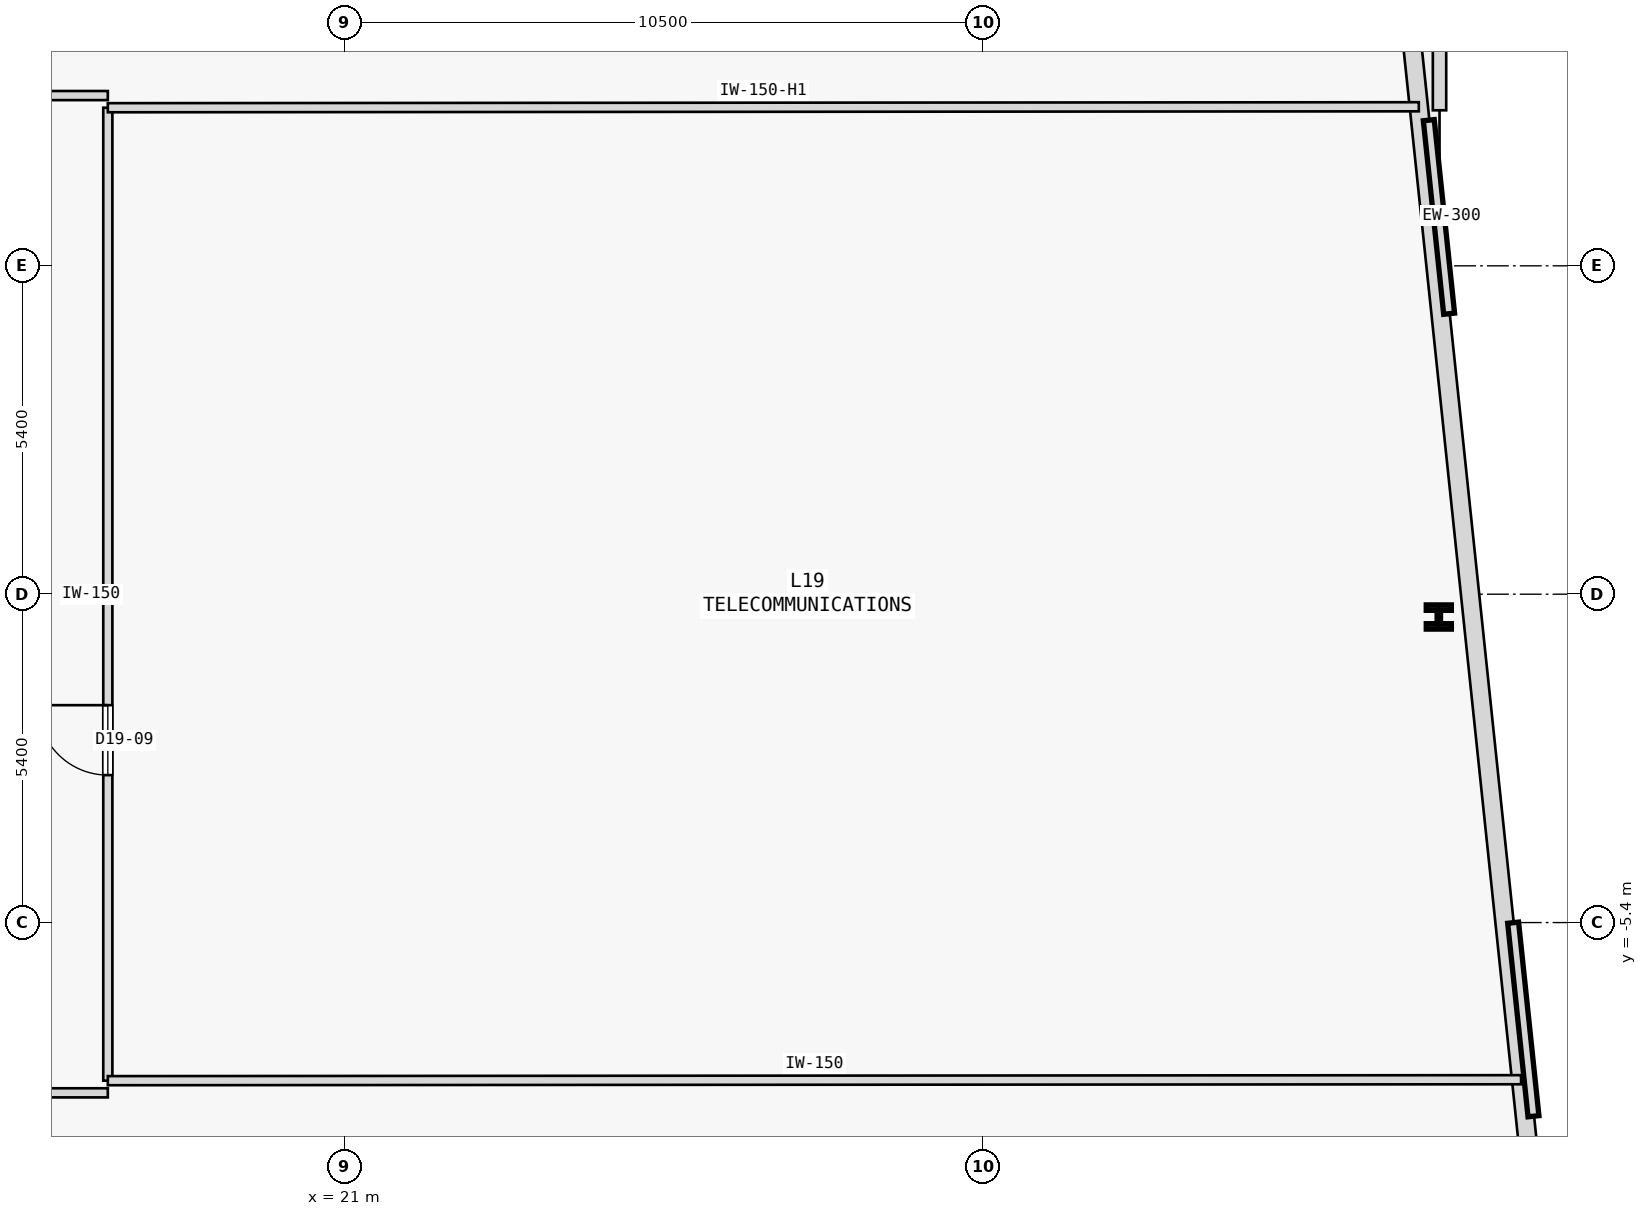
"""IFC4 building model, lengths in metres.
Left out: names, types, materials, properties, quantities, classifications, styles, units other than length and angle.
Written with IfcOpenShell. Run it as: python <this file> out.ifc"""

import sys

from ifc_helpers import new_model, si_unit, direction, frame, frame_2d, origin, origin_2d, place, context, subcontext, project, spatial, rectangle, i_section, extrude, element, fill, save


model = new_model("IFC4")
c1 = context("Model", 3, precision=1e-05, world=origin(), true_north=direction((0.0, 1.0)))
c2 = subcontext(c1, "Body", "Model", "MODEL_VIEW")
j1 = project(units=[si_unit("LENGTHUNIT", "METRE"), si_unit("PLANEANGLEUNIT", "RADIAN")], contexts=[c1])
p1 = place(None, origin())
s1 = spatial("IfcSite", under=j1, at=p1, CompositionType="ELEMENT")
p2 = place(p1, origin())
s2 = spatial("IfcBuilding", under=s1, at=p2, CompositionType="ELEMENT")
p3 = place(p2, frame((0.0, 0.0, 78.8)))
s3 = spatial("IfcBuildingStorey", under=s2, at=p3, CompositionType="ELEMENT", Elevation=78.8)
p4 = place(p3, frame((38.988, -0.375, 0.0), z_axis=(0.0, 0.0, 1.0), x_axis=(1.0, 0.0, 0.0)))
e1 = element("IfcColumn", 1, at=p4, inside=s3, PredefinedType="COLUMN", context=c2, shape_type="SweptSolid", body=[
    extrude(i_section(OverallWidth=0.413, OverallDepth=0.398, WebThickness=0.056, FlangeThickness=0.089, FilletRadius=0.015, at=origin_2d()), origin(), (0.0, 0.0, 1.0), 4.4),
])
p5 = place(p3, frame((39.0, 7.958, 0.0), z_axis=(0.0, 0.0, 1.0), x_axis=(0.0, 1.0, 0.0)))
e2 = element("IfcWall", 2, at=p5, inside=s3, PredefinedType="PARAPET", context=c2, shape_type="SweptSolid", body=[
    extrude(rectangle(XDim=13.421, YDim=0.22, at=frame_2d((6.71, 0.0))), origin(), (0.0, 0.0, 1.0), 1.2),
])
p6 = place(p3, frame((40.932, -13.607, 0.0), z_axis=(0.0, 0.0, 1.0), x_axis=(-0.104531231484, 0.994521604413, 0.0)))
e3 = element("IfcWall", 3, at=p6, inside=s3, PredefinedType="STANDARD", context=c2, shape_type="SweptSolid", body=[
    extrude(rectangle(XDim=39.81, YDim=0.3, at=frame_2d((19.905, 0.0))), origin(), (0.0, 0.0, 1.0), 4.15),
])
p7 = place(p3, frame((0.4, 8.2, 0.0), z_axis=(0.0, 0.0, 1.0), x_axis=(1.0, 0.0, 0.0)))
e4 = element("IfcWall", 4, at=p7, inside=s3, PredefinedType="PARTITIONING", context=c2, shape_type="SweptSolid", body=[
    extrude(rectangle(XDim=16.7, YDim=0.15, at=frame_2d((8.35, 0.0))), origin(), (0.0, 0.0, 1.0), 4.15),
])
p8 = place(p7, frame((7.775, 0.0, 0.0)))
e5 = element("IfcOpeningElement", 5, at=p8, cuts=e4, PredefinedType="OPENING", context=c2, shape_type="SweptSolid", body=[
    extrude(rectangle(XDim=1.15, YDim=2.15, at=frame_2d((0.575, 1.075))), frame((0.0, 0.085, 0.0), z_axis=(0.0, -1.0, 0.0), x_axis=(1.0, 0.0, 0.0)), (0.0, 0.0, 1.0), 0.17),
])
p9 = place(p3, frame((0.1, -8.2, 0.0), z_axis=(0.0, 0.0, 1.0), x_axis=(1.0, 0.0, 0.0)))
e6 = element("IfcWall", 6, at=p9, inside=s3, PredefinedType="PARTITIONING", context=c2, shape_type="SweptSolid", body=[
    extrude(rectangle(XDim=17.0, YDim=0.15, at=frame_2d((8.5, 0.0))), origin(), (0.0, 0.0, 1.0), 4.15),
])
p10 = place(p9, frame((7.925, 0.0, 0.0)))
e7 = element("IfcOpeningElement", 7, at=p10, cuts=e6, PredefinedType="OPENING", context=c2, shape_type="SweptSolid", body=[
    extrude(rectangle(XDim=1.15, YDim=2.15, at=frame_2d((0.575, 1.075))), frame((0.0, 0.085, 0.0), z_axis=(0.0, -1.0, 0.0), x_axis=(1.0, 0.0, 0.0)), (0.0, 0.0, 1.0), 0.17),
])
p11 = place(p3, frame((17.1, -8.0, 0.0), z_axis=(0.0, 0.0, 1.0), x_axis=(0.0, 1.0, 0.0)))
e8 = element("IfcWall", 8, at=p11, inside=s3, PredefinedType="PARTITIONING", context=c2, shape_type="SweptSolid", body=[
    extrude(rectangle(XDim=16.0, YDim=0.15, at=frame_2d((8.0, 0.0))), origin(), (0.0, 0.0, 1.0), 4.15),
])
p12 = place(p11, frame((5.025, 0.0, 0.0)))
e9 = element("IfcOpeningElement", 9, at=p12, cuts=e8, PredefinedType="OPENING", context=c2, shape_type="SweptSolid", body=[
    extrude(rectangle(XDim=1.15, YDim=2.15, at=frame_2d((0.575, 1.075))), frame((0.0, 0.085, 0.0), z_axis=(0.0, -1.0, 0.0), x_axis=(1.0, 0.0, 0.0)), (0.0, 0.0, 1.0), 0.17),
])
p13 = place(p3, frame((17.1, 8.0, 0.0), z_axis=(0.0, 0.0, 1.0), x_axis=(0.999999737373, 0.000724744167, 0.0)))
e10 = element("IfcWall", 10, at=p13, inside=s3, PredefinedType="PARTITIONING", context=c2, shape_type="SweptSolid", body=[
    extrude(rectangle(XDim=21.559, YDim=0.15, at=frame_2d((10.78, 0.0))), origin(), (0.0, 0.0, 1.0), 3.7),
])
p14 = place(p3, frame((17.1, -8.0, 0.0), z_axis=(0.0, 0.0, 1.0), x_axis=(0.999999774004, 0.000672304066, 0.0)))
e11 = element("IfcWall", 11, at=p14, inside=s3, PredefinedType="PARTITIONING", context=c2, shape_type="SweptSolid", body=[
    extrude(rectangle(XDim=23.241, YDim=0.15, at=frame_2d((11.621, 0.0))), origin(), (0.0, 0.0, 1.0), 4.15),
])
p15 = place(p12, origin())
e12 = element("IfcDoor", 12, at=p15, inside=s3, OperationType="SINGLE_SWING_RIGHT", PredefinedType="DOOR", context=c2, shape_type="SweptSolid", body=[
    extrude(rectangle(XDim=1.15, YDim=2.15, at=frame_2d((0.575, 1.075))), frame((0.0, 0.025, 0.0), z_axis=(0.0, -1.0, 0.0), x_axis=(1.0, 0.0, 0.0)), (0.0, 0.0, 1.0), 0.05),
])
fill(e9, e12)
save(model, sys.argv[1])
